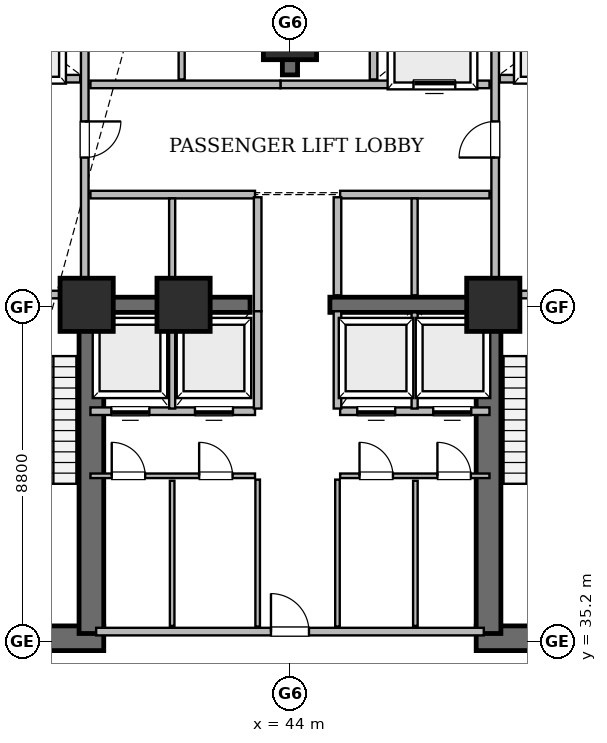
"""IFC4 building model, lengths in metres.
Left out: names, types, materials, properties, quantities, classifications, styles, units other than length and angle.
Written with IfcOpenShell. Run it as: python <this file> out.ifc"""

import sys

from ifc_helpers import new_model, si_unit, direction, frame, frame_2d, origin, origin_2d, place, context, subcontext, project, spatial, rectangle, extrude, element, fill, save


model = new_model("IFC4")
c1 = context("Model", 3, precision=1e-05, world=origin(), true_north=direction((0.0, 1.0)))
c2 = subcontext(c1, "Body", "Model", "MODEL_VIEW")
j1 = project(units=[si_unit("LENGTHUNIT", "METRE"), si_unit("PLANEANGLEUNIT", "RADIAN")], contexts=[c1])
p1 = place(None, origin())
s1 = spatial("IfcSite", under=j1, at=p1, CompositionType="ELEMENT")
p2 = place(p1, origin())
s2 = spatial("IfcBuilding", under=s1, at=p2, CompositionType="ELEMENT")
p3 = place(p2, frame((0.0, 0.0, 9.6)))
s3 = spatial("IfcBuildingStorey", under=s2, at=p3, CompositionType="ELEMENT", Elevation=9.6)
for number, where, z_axis, x_axis in (
    (1, (34.95, 35.275, 0.0), (0.0, 0.0, 1.0), (1.0, 0.0, 0.0)),
    (2, (48.9, 35.275, 0.0), (0.0, 0.0, 1.0), (1.0, 0.0, 0.0)),
):
    element("IfcWall", number, at=place(p3, frame(where, z_axis=z_axis, x_axis=x_axis)), inside=s3, PredefinedType="SHEAR", context=c2, shape_type="SweptSolid", body=[
        extrude(rectangle(XDim=4.15, YDim=0.65, at=frame_2d((2.075, 0.0))), origin(), (0.0, 0.0, 1.0), 4.5),
    ])
for number, where, z_axis, x_axis in (
    (3, (38.775, 35.4, 0.0), (0.0, 0.0, 1.0), (0.0, 1.0, 0.0)),
    (4, (49.225, 35.4, 0.0), (0.0, 0.0, 1.0), (0.0, 1.0, 0.0)),
):
    element("IfcWall", number, at=place(p3, frame(where, z_axis=z_axis, x_axis=x_axis)), inside=s3, PredefinedType="SHEAR", context=c2, shape_type="SweptSolid", body=[
        extrude(rectangle(XDim=8.95, YDim=0.65, at=frame_2d((4.475, 0.0))), origin(), (0.0, 0.0, 1.0), 4.5),
    ])
p4 = place(p3, frame((44.0, 50.1, 0.0), z_axis=(0.0, 0.0, 1.0), x_axis=(0.0, 1.0, 0.0)))
e5 = element("IfcWall", 5, at=p4, inside=s3, PredefinedType="SHEAR", context=c2, shape_type="SweptSolid", body=[
    extrude(rectangle(XDim=2.1, YDim=0.4, at=frame_2d((1.05, 0.0))), origin(), (0.0, 0.0, 1.0), 4.5),
])
for number, where, z_axis, x_axis in (
    (6, (38.75, 44.05, 0.0), (0.0, 0.0, 1.0), (1.0, 0.0, 0.0)),
    (7, (45.05, 44.05, 0.0), (0.0, 0.0, 1.0), (1.0, 0.0, 0.0)),
):
    element("IfcWall", number, at=place(p3, frame(where, z_axis=z_axis, x_axis=x_axis)), inside=s3, PredefinedType="SHEAR", context=c2, shape_type="SweptSolid", body=[
        extrude(rectangle(XDim=4.2, YDim=0.4, at=frame_2d((2.1, 0.0))), origin(), (0.0, 0.0, 1.0), 4.5),
    ])
for number, where, z_axis, x_axis in (
    (8, (38.65, 44.05, 0.0), (0.0, 0.0, 1.0), (1.0, 0.0, 0.0)),
    (9, (49.35, 44.05, 0.0), (0.0, 0.0, 1.0), (1.0, 0.0, 0.0)),
    (10, (44.0, 51.2, 0.0), (0.0, 0.0, 1.0), (1.0, 0.0, 0.0)),
    (11, (41.2, 44.05, 0.0), (0.0, 0.0, 1.0), (1.0, 0.0, 0.0)),
):
    element("IfcColumn", number, at=place(p3, frame(where, z_axis=z_axis, x_axis=x_axis)), inside=s3, PredefinedType="COLUMN", context=c2, shape_type="SweptSolid", body=[
        extrude(rectangle(XDim=1.4, YDim=1.4, at=origin_2d()), origin(), (0.0, 0.0, 1.0), 4.8),
    ])
p5 = place(p3, frame((38.9, 35.45, 0.0), z_axis=(0.0, 0.0, 1.0), x_axis=(1.0, 0.0, 0.0)))
e12 = element("IfcWall", 12, at=p5, inside=s3, PredefinedType="SOLIDWALL", context=c2, shape_type="SweptSolid", body=[
    extrude(rectangle(XDim=10.2, YDim=0.2, at=frame_2d((5.1, 0.0))), origin(), (0.0, 0.0, 1.0), 4.5),
])
p6 = place(p5, frame((4.6, 0.0, 0.0)))
e13 = element("IfcOpeningElement", 13, at=p6, cuts=e12, PredefinedType="OPENING", context=c2, shape_type="SweptSolid", body=[
    extrude(rectangle(XDim=1.0, YDim=2.15, at=frame_2d((0.5, 1.075))), frame((0.0, 0.11, 0.0), z_axis=(0.0, -1.0, 0.0), x_axis=(1.0, 0.0, 0.0)), (0.0, 0.0, 1.0), 0.22),
])
p7 = place(p3, frame((38.6, 44.5, 0.0), z_axis=(0.0, 0.0, 1.0), x_axis=(0.0, 1.0, 0.0)))
e14 = element("IfcWall", 14, at=p7, inside=s3, PredefinedType="SOLIDWALL", context=c2, shape_type="SweptSolid", body=[
    extrude(rectangle(XDim=7.92, YDim=0.2, at=frame_2d((3.96, 0.0))), origin(), (0.0, 0.0, 1.0), 4.5),
])
p8 = place(p7, frame((3.425, 0.0, 0.0)))
e15 = element("IfcOpeningElement", 15, at=p8, cuts=e14, PredefinedType="OPENING", context=c2, shape_type="SweptSolid", body=[
    extrude(rectangle(XDim=0.95, YDim=2.15, at=frame_2d((0.475, 1.075))), frame((0.0, 0.11, 0.0), z_axis=(0.0, -1.0, 0.0), x_axis=(1.0, 0.0, 0.0)), (0.0, 0.0, 1.0), 0.22),
])
p9 = place(p3, frame((49.4, 44.5, 0.0), z_axis=(0.0, 0.0, 1.0), x_axis=(0.0, 1.0, 0.0)))
e16 = element("IfcWall", 16, at=p9, inside=s3, PredefinedType="SOLIDWALL", context=c2, shape_type="SweptSolid", body=[
    extrude(rectangle(XDim=7.92, YDim=0.2, at=frame_2d((3.96, 0.0))), origin(), (0.0, 0.0, 1.0), 3.588),
])
p10 = place(p9, frame((3.425, 0.0, 0.0)))
e17 = element("IfcOpeningElement", 17, at=p10, cuts=e16, PredefinedType="OPENING", context=c2, shape_type="SweptSolid", body=[
    extrude(rectangle(XDim=0.95, YDim=2.15, at=frame_2d((0.475, 1.075))), frame((0.0, 0.11, 0.0), z_axis=(0.0, -1.0, 0.0), x_axis=(1.0, 0.0, 0.0)), (0.0, 0.0, 1.0), 0.22),
])
p11 = place(p3, frame((43.75, 49.85, 0.0), z_axis=(0.0, 0.0, 1.0), x_axis=(1.0, 0.0, 0.0)))
e18 = element("IfcWall", 18, at=p11, inside=s3, PredefinedType="SOLIDWALL", context=c2, shape_type="SweptSolid", body=[
    extrude(rectangle(XDim=5.5, YDim=0.2, at=frame_2d((2.75, 0.0))), origin(), (0.0, 0.0, 1.0), 3.588),
])
p12 = place(p11, frame((3.5, 0.0, 0.0)))
e19 = element("IfcOpeningElement", 19, at=p12, cuts=e18, PredefinedType="OPENING", context=c2, shape_type="SweptSolid", body=[
    extrude(rectangle(XDim=1.1, YDim=2.15, at=frame_2d((0.55, 1.075))), frame((0.0, 0.11, 0.0), z_axis=(0.0, -1.0, 0.0), x_axis=(1.0, 0.0, 0.0)), (0.0, 0.0, 1.0), 0.22),
])
p13 = place(p3, frame((38.75, 41.25, 0.0), z_axis=(0.0, 0.0, 1.0), x_axis=(1.0, 0.0, 0.0)))
e20 = element("IfcWall", 20, at=p13, inside=s3, PredefinedType="SOLIDWALL", context=c2, shape_type="SweptSolid", body=[
    extrude(rectangle(XDim=4.33, YDim=0.2, at=frame_2d((2.165, 0.0))), origin(), (0.0, 0.0, 1.0), 4.5),
])
p14 = place(p13, frame((0.55, 0.0, 0.0)))
e21 = element("IfcOpeningElement", 21, at=p14, cuts=e20, PredefinedType="OPENING", context=c2, shape_type="SweptSolid", body=[
    extrude(rectangle(XDim=1.0, YDim=2.15, at=frame_2d((0.5, 1.075))), frame((0.0, 0.11, 0.0), z_axis=(0.0, -1.0, 0.0), x_axis=(1.0, 0.0, 0.0)), (0.0, 0.0, 1.0), 0.22),
])
p15 = place(p13, frame((2.75, 0.0, 0.0)))
e22 = element("IfcOpeningElement", 22, at=p15, cuts=e20, PredefinedType="OPENING", context=c2, shape_type="SweptSolid", body=[
    extrude(rectangle(XDim=1.0, YDim=2.15, at=frame_2d((0.5, 1.075))), frame((0.0, 0.11, 0.0), z_axis=(0.0, -1.0, 0.0), x_axis=(1.0, 0.0, 0.0)), (0.0, 0.0, 1.0), 0.22),
])
p16 = place(p3, frame((38.75, 39.55, 0.0), z_axis=(0.0, 0.0, 1.0), x_axis=(1.0, 0.0, 0.0)))
e23 = element("IfcWall", 23, at=p16, inside=s3, PredefinedType="PARTITIONING", context=c2, shape_type="SweptSolid", body=[
    extrude(rectangle(XDim=4.33, YDim=0.12, at=frame_2d((2.165, 0.0))), origin(), (0.0, 0.0, 1.0), 4.5),
])
p17 = place(p16, frame((0.56, 0.0, 0.0)))
e24 = element("IfcOpeningElement", 24, at=p17, cuts=e23, PredefinedType="OPENING", context=c2, shape_type="SweptSolid", body=[
    extrude(rectangle(XDim=0.88, YDim=2.1, at=frame_2d((0.44, 1.05))), frame((0.0, 0.07, 0.0), z_axis=(0.0, -1.0, 0.0), x_axis=(1.0, 0.0, 0.0)), (0.0, 0.0, 1.0), 0.14),
])
p18 = place(p16, frame((2.86, 0.0, 0.0)))
e25 = element("IfcOpeningElement", 25, at=p18, cuts=e23, PredefinedType="OPENING", context=c2, shape_type="SweptSolid", body=[
    extrude(rectangle(XDim=0.88, YDim=2.1, at=frame_2d((0.44, 1.05))), frame((0.0, 0.07, 0.0), z_axis=(0.0, -1.0, 0.0), x_axis=(1.0, 0.0, 0.0)), (0.0, 0.0, 1.0), 0.14),
])
p19 = place(p3, frame((45.32, 41.25, 0.0), z_axis=(0.0, 0.0, 1.0), x_axis=(1.0, 0.0, 0.0)))
e26 = element("IfcWall", 26, at=p19, inside=s3, PredefinedType="SOLIDWALL", context=c2, shape_type="SweptSolid", body=[
    extrude(rectangle(XDim=3.93, YDim=0.2, at=frame_2d((1.965, 0.0))), origin(), (0.0, 0.0, 1.0), 4.5),
])
p20 = place(p19, frame((0.45, 0.0, 0.0)))
e27 = element("IfcOpeningElement", 27, at=p20, cuts=e26, PredefinedType="OPENING", context=c2, shape_type="SweptSolid", body=[
    extrude(rectangle(XDim=1.0, YDim=2.15, at=frame_2d((0.5, 1.075))), frame((0.0, 0.11, 0.0), z_axis=(0.0, -1.0, 0.0), x_axis=(1.0, 0.0, 0.0)), (0.0, 0.0, 1.0), 0.22),
])
p21 = place(p19, frame((2.45, 0.0, 0.0)))
e28 = element("IfcOpeningElement", 28, at=p21, cuts=e26, PredefinedType="OPENING", context=c2, shape_type="SweptSolid", body=[
    extrude(rectangle(XDim=1.0, YDim=2.15, at=frame_2d((0.5, 1.075))), frame((0.0, 0.11, 0.0), z_axis=(0.0, -1.0, 0.0), x_axis=(1.0, 0.0, 0.0)), (0.0, 0.0, 1.0), 0.22),
])
p22 = place(p3, frame((45.32, 39.55, 0.0), z_axis=(0.0, 0.0, 1.0), x_axis=(1.0, 0.0, 0.0)))
e29 = element("IfcWall", 29, at=p22, inside=s3, PredefinedType="PARTITIONING", context=c2, shape_type="SweptSolid", body=[
    extrude(rectangle(XDim=3.93, YDim=0.12, at=frame_2d((1.965, 0.0))), origin(), (0.0, 0.0, 1.0), 4.5),
])
p23 = place(p22, frame((0.51, 0.0, 0.0)))
e30 = element("IfcOpeningElement", 30, at=p23, cuts=e29, PredefinedType="OPENING", context=c2, shape_type="SweptSolid", body=[
    extrude(rectangle(XDim=0.88, YDim=2.1, at=frame_2d((0.44, 1.05))), frame((0.0, 0.07, 0.0), z_axis=(0.0, -1.0, 0.0), x_axis=(1.0, 0.0, 0.0)), (0.0, 0.0, 1.0), 0.14),
])
p24 = place(p22, frame((2.56, 0.0, 0.0)))
e31 = element("IfcOpeningElement", 31, at=p24, cuts=e29, PredefinedType="OPENING", context=c2, shape_type="SweptSolid", body=[
    extrude(rectangle(XDim=0.88, YDim=2.1, at=frame_2d((0.44, 1.05))), frame((0.0, 0.07, 0.0), z_axis=(0.0, -1.0, 0.0), x_axis=(1.0, 0.0, 0.0)), (0.0, 0.0, 1.0), 0.14),
])
p25 = place(p3, frame((35.65, 44.32, 0.0), z_axis=(0.0, 0.0, 1.0), x_axis=(1.0, 0.0, 0.0)))
e32 = element("IfcWall", 32, at=p25, inside=s3, PredefinedType="SOLIDWALL", context=c2, shape_type="SweptSolid", body=[
    extrude(rectangle(XDim=2.8, YDim=0.2, at=frame_2d((1.4, 0.0))), origin(), (0.0, 0.0, 1.0), 4.5),
])
p26 = place(p25, frame((0.9, 0.0, 0.0)))
e33 = element("IfcOpeningElement", 33, at=p26, cuts=e32, PredefinedType="OPENING", context=c2, shape_type="SweptSolid", body=[
    extrude(rectangle(XDim=1.0, YDim=2.15, at=frame_2d((0.5, 1.075))), frame((0.0, 0.11, 0.0), z_axis=(0.0, -1.0, 0.0), x_axis=(1.0, 0.0, 0.0)), (0.0, 0.0, 1.0), 0.22),
])
p27 = place(p3, frame((49.55, 44.32, 0.0), z_axis=(0.0, 0.0, 1.0), x_axis=(1.0, 0.0, 0.0)))
e34 = element("IfcWall", 34, at=p27, inside=s3, PredefinedType="SOLIDWALL", context=c2, shape_type="SweptSolid", body=[
    extrude(rectangle(XDim=2.8, YDim=0.2, at=frame_2d((1.4, 0.0))), origin(), (0.0, 0.0, 1.0), 3.588),
])
p28 = place(p27, frame((0.9, 0.0, 0.0)))
e35 = element("IfcOpeningElement", 35, at=p28, cuts=e34, PredefinedType="OPENING", context=c2, shape_type="SweptSolid", body=[
    extrude(rectangle(XDim=1.0, YDim=2.15, at=frame_2d((0.5, 1.075))), frame((0.0, 0.11, 0.0), z_axis=(0.0, -1.0, 0.0), x_axis=(1.0, 0.0, 0.0)), (0.0, 0.0, 1.0), 0.22),
])
p29 = place(p3, frame((35.68, 50.0, 0.0), z_axis=(0.0, 0.0, 1.0), x_axis=(1.0, 0.0, 0.0)))
e36 = element("IfcWall", 36, at=p29, inside=s3, PredefinedType="SOLIDWALL", context=c2, shape_type="SweptSolid", body=[
    extrude(rectangle(XDim=2.8, YDim=0.2, at=frame_2d((1.4, 0.0))), origin(), (0.0, 0.0, 1.0), 4.5),
])
p30 = place(p29, frame((0.85, 0.0, 0.0)))
e37 = element("IfcOpeningElement", 37, at=p30, cuts=e36, PredefinedType="OPENING", context=c2, shape_type="SweptSolid", body=[
    extrude(rectangle(XDim=1.1, YDim=2.15, at=frame_2d((0.55, 1.075))), frame((0.0, 0.11, 0.0), z_axis=(0.0, -1.0, 0.0), x_axis=(1.0, 0.0, 0.0)), (0.0, 0.0, 1.0), 0.22),
])
p31 = place(p3, frame((49.52, 50.0, 0.0), z_axis=(0.0, 0.0, 1.0), x_axis=(1.0, 0.0, 0.0)))
e38 = element("IfcWall", 38, at=p31, inside=s3, PredefinedType="SOLIDWALL", context=c2, shape_type="SweptSolid", body=[
    extrude(rectangle(XDim=2.8, YDim=0.2, at=frame_2d((1.4, 0.0))), origin(), (0.0, 0.0, 1.0), 4.5),
])
p32 = place(p31, frame((0.85, 0.0, 0.0)))
e39 = element("IfcOpeningElement", 39, at=p32, cuts=e38, PredefinedType="OPENING", context=c2, shape_type="SweptSolid", body=[
    extrude(rectangle(XDim=1.1, YDim=2.15, at=frame_2d((0.55, 1.075))), frame((0.0, 0.11, 0.0), z_axis=(0.0, -1.0, 0.0), x_axis=(1.0, 0.0, 0.0)), (0.0, 0.0, 1.0), 0.22),
])
p33 = place(p3, frame((38.75, 49.85, 0.0), z_axis=(0.0, 0.0, 1.0), x_axis=(1.0, 0.0, 0.0)))
e40 = element("IfcWall", 40, at=p33, inside=s3, PredefinedType="SOLIDWALL", context=c2, shape_type="SweptSolid", body=[
    extrude(rectangle(XDim=5.0, YDim=0.2, at=frame_2d((2.5, 0.0))), origin(), (0.0, 0.0, 1.0), 4.5),
])
p34 = place(p3, frame((38.75, 46.95, 0.0), z_axis=(0.0, 0.0, 1.0), x_axis=(1.0, 0.0, 0.0)))
e41 = element("IfcWall", 41, at=p34, inside=s3, PredefinedType="SOLIDWALL", context=c2, shape_type="SweptSolid", body=[
    extrude(rectangle(XDim=4.33, YDim=0.2, at=frame_2d((2.165, 0.0))), origin(), (0.0, 0.0, 1.0), 4.5),
])
p35 = place(p3, frame((45.32, 46.95, 0.0), z_axis=(0.0, 0.0, 1.0), x_axis=(1.0, 0.0, 0.0)))
e42 = element("IfcWall", 42, at=p35, inside=s3, PredefinedType="SOLIDWALL", context=c2, shape_type="SweptSolid", body=[
    extrude(rectangle(XDim=3.93, YDim=0.2, at=frame_2d((1.965, 0.0))), origin(), (0.0, 0.0, 1.0), 3.588),
])
for number, where, z_axis, x_axis in (
    (43, (43.15, 35.58, 0.0), (0.0, 0.0, 1.0), (0.0, 1.0, 0.0)),
    (44, (45.25, 35.58, 0.0), (0.0, 0.0, 1.0), (0.0, 1.0, 0.0)),
):
    element("IfcWall", number, at=place(p3, frame(where, z_axis=z_axis, x_axis=x_axis)), inside=s3, PredefinedType="PARTITIONING", context=c2, shape_type="SweptSolid", body=[
        extrude(rectangle(XDim=3.87, YDim=0.12, at=frame_2d((1.935, 0.0))), origin(), (0.0, 0.0, 1.0), 4.5),
    ])
for number, where, z_axis, x_axis in (
    (45, (40.9, 35.6, 0.0), (0.0, 0.0, 1.0), (0.0, 1.0, 0.0)),
    (46, (47.3, 35.6, 0.0), (0.0, 0.0, 1.0), (0.0, 1.0, 0.0)),
):
    element("IfcWall", number, at=place(p3, frame(where, z_axis=z_axis, x_axis=x_axis)), inside=s3, PredefinedType="PARTITIONING", context=c2, shape_type="SweptSolid", body=[
        extrude(rectangle(XDim=3.82, YDim=0.12, at=frame_2d((1.91, 0.0))), origin(), (0.0, 0.0, 1.0), 4.5),
    ])
p36 = place(p3, frame((43.15, 43.88, 0.0), z_axis=(0.0, 0.0, 1.0), x_axis=(0.0, 1.0, 0.0)))
e47 = element("IfcWall", 47, at=p36, inside=s3, PredefinedType="SOLIDWALL", context=c2, shape_type="SweptSolid", body=[
    extrude(rectangle(XDim=3.0, YDim=0.2, at=frame_2d((1.5, 0.0))), origin(), (0.0, 0.0, 1.0), 4.5),
])
p37 = place(p3, frame((45.25, 44.3, 0.0), z_axis=(0.0, 0.0, 1.0), x_axis=(0.0, 1.0, 0.0)))
e48 = element("IfcWall", 48, at=p37, inside=s3, PredefinedType="SOLIDWALL", context=c2, shape_type="SweptSolid", body=[
    extrude(rectangle(XDim=2.58, YDim=0.2, at=frame_2d((1.29, 0.0))), origin(), (0.0, 0.0, 1.0), 4.5),
])
for number, where, z_axis, x_axis in (
    (49, (43.15, 41.32, 0.0), (0.0, 0.0, 1.0), (0.0, 1.0, 0.0)),
    (50, (45.25, 41.32, 0.0), (0.0, 0.0, 1.0), (0.0, 1.0, 0.0)),
):
    element("IfcWall", number, at=place(p3, frame(where, z_axis=z_axis, x_axis=x_axis)), inside=s3, PredefinedType="SOLIDWALL", context=c2, shape_type="SweptSolid", body=[
        extrude(rectangle(XDim=2.56, YDim=0.2, at=frame_2d((1.28, 0.0))), origin(), (0.0, 0.0, 1.0), 4.5),
    ])
p38 = place(p3, frame((40.9, 44.3, 0.0), z_axis=(0.0, 0.0, 1.0), x_axis=(0.0, 1.0, 0.0)))
e51 = element("IfcWall", 51, at=p38, inside=s3, PredefinedType="SOLIDWALL", context=c2, shape_type="SweptSolid", body=[
    extrude(rectangle(XDim=2.55, YDim=0.16, at=frame_2d((1.275, 0.0))), origin(), (0.0, 0.0, 1.0), 4.5),
])
p39 = place(p3, frame((47.28, 44.3, 0.0), z_axis=(0.0, 0.0, 1.0), x_axis=(0.0, 1.0, 0.0)))
e52 = element("IfcWall", 52, at=p39, inside=s3, PredefinedType="SOLIDWALL", context=c2, shape_type="SweptSolid", body=[
    extrude(rectangle(XDim=2.55, YDim=0.16, at=frame_2d((1.275, 0.0))), origin(), (0.0, 0.0, 1.0), 3.588),
])
for number, where, z_axis, x_axis in (
    (53, (40.9, 41.32, 0.0), (0.0, 0.0, 1.0), (0.0, 1.0, 0.0)),
    (54, (47.28, 41.32, 0.0), (0.0, 0.0, 1.0), (0.0, 1.0, 0.0)),
):
    element("IfcWall", number, at=place(p3, frame(where, z_axis=z_axis, x_axis=x_axis)), inside=s3, PredefinedType="SOLIDWALL", context=c2, shape_type="SweptSolid", body=[
        extrude(rectangle(XDim=2.53, YDim=0.16, at=frame_2d((1.265, 0.0))), origin(), (0.0, 0.0, 1.0), 4.5),
    ])
p40 = place(p3, frame((41.15, 49.98, 0.0), z_axis=(0.0, 0.0, 1.0), x_axis=(0.0, 1.0, 0.0)))
e55 = element("IfcWall", 55, at=p40, inside=s3, PredefinedType="SOLIDWALL", context=c2, shape_type="SweptSolid", body=[
    extrude(rectangle(XDim=2.37, YDim=0.16, at=frame_2d((1.185, 0.0))), origin(), (0.0, 0.0, 1.0), 4.5),
])
p41 = place(p3, frame((46.2, 49.98, 0.0), z_axis=(0.0, 0.0, 1.0), x_axis=(0.0, 1.0, 0.0)))
e56 = element("IfcWall", 56, at=p41, inside=s3, PredefinedType="SOLIDWALL", context=c2, shape_type="SweptSolid", body=[
    extrude(rectangle(XDim=2.37, YDim=0.2, at=frame_2d((1.185, 0.0))), origin(), (0.0, 0.0, 1.0), 4.5),
])
p42 = place(p8, frame((0.95, 0.0, 0.0), z_axis=(0.0, 0.0, 1.0), x_axis=(-1.0, 0.0, 0.0)))
e57 = element("IfcDoor", 57, at=p42, inside=s3, OperationType="SINGLE_SWING_RIGHT", PredefinedType="DOOR", context=c2, shape_type="SweptSolid", body=[
    extrude(rectangle(XDim=0.95, YDim=2.15, at=frame_2d((0.475, 1.075))), frame((0.0, 0.025, 0.0), z_axis=(0.0, -1.0, 0.0), x_axis=(1.0, 0.0, 0.0)), (0.0, 0.0, 1.0), 0.05),
])
fill(e15, e57)
p43 = place(p10, origin())
e58 = element("IfcDoor", 58, at=p43, inside=s3, OperationType="SINGLE_SWING_LEFT", PredefinedType="DOOR", context=c2, shape_type="SweptSolid", body=[
    extrude(rectangle(XDim=0.95, YDim=2.15, at=frame_2d((0.475, 1.075))), frame((0.0, 0.025, 0.0), z_axis=(0.0, -1.0, 0.0), x_axis=(1.0, 0.0, 0.0)), (0.0, 0.0, 1.0), 0.05),
])
fill(e17, e58)
p44 = place(p6, origin())
e59 = element("IfcDoor", 59, at=p44, inside=s3, OperationType="SINGLE_SWING_LEFT", PredefinedType="DOOR", context=c2, shape_type="SweptSolid", body=[
    extrude(rectangle(XDim=1.0, YDim=2.15, at=frame_2d((0.5, 1.075))), frame((0.0, 0.025, 0.0), z_axis=(0.0, -1.0, 0.0), x_axis=(1.0, 0.0, 0.0)), (0.0, 0.0, 1.0), 0.05),
])
fill(e13, e59)
p45 = place(p12, origin())
e60 = element("IfcDoor", 60, at=p45, inside=s3, OperationType="SLIDING_TO_LEFT", PredefinedType="DOOR", context=c2, shape_type="SweptSolid", body=[
    extrude(rectangle(XDim=1.1, YDim=2.15, at=frame_2d((0.55, 1.075))), frame((0.0, 0.025, 0.0), z_axis=(0.0, -1.0, 0.0), x_axis=(1.0, 0.0, 0.0)), (0.0, 0.0, 1.0), 0.05),
])
fill(e19, e60)
p46 = place(p14, frame((1.0, 0.0, 0.0), z_axis=(0.0, 0.0, 1.0), x_axis=(-1.0, 0.0, 0.0)))
e61 = element("IfcDoor", 61, at=p46, inside=s3, OperationType="SLIDING_TO_LEFT", PredefinedType="DOOR", context=c2, shape_type="SweptSolid", body=[
    extrude(rectangle(XDim=1.0, YDim=2.15, at=frame_2d((0.5, 1.075))), frame((0.0, 0.025, 0.0), z_axis=(0.0, -1.0, 0.0), x_axis=(1.0, 0.0, 0.0)), (0.0, 0.0, 1.0), 0.05),
])
fill(e21, e61)
p47 = place(p15, frame((1.0, 0.0, 0.0), z_axis=(0.0, 0.0, 1.0), x_axis=(-1.0, 0.0, 0.0)))
e62 = element("IfcDoor", 62, at=p47, inside=s3, OperationType="SLIDING_TO_LEFT", PredefinedType="DOOR", context=c2, shape_type="SweptSolid", body=[
    extrude(rectangle(XDim=1.0, YDim=2.15, at=frame_2d((0.5, 1.075))), frame((0.0, 0.025, 0.0), z_axis=(0.0, -1.0, 0.0), x_axis=(1.0, 0.0, 0.0)), (0.0, 0.0, 1.0), 0.05),
])
fill(e22, e62)
p48 = place(p20, frame((1.0, 0.0, 0.0), z_axis=(0.0, 0.0, 1.0), x_axis=(-1.0, 0.0, 0.0)))
e63 = element("IfcDoor", 63, at=p48, inside=s3, OperationType="SLIDING_TO_LEFT", PredefinedType="DOOR", context=c2, shape_type="SweptSolid", body=[
    extrude(rectangle(XDim=1.0, YDim=2.15, at=frame_2d((0.5, 1.075))), frame((0.0, 0.025, 0.0), z_axis=(0.0, -1.0, 0.0), x_axis=(1.0, 0.0, 0.0)), (0.0, 0.0, 1.0), 0.05),
])
fill(e27, e63)
p49 = place(p21, frame((1.0, 0.0, 0.0), z_axis=(0.0, 0.0, 1.0), x_axis=(-1.0, 0.0, 0.0)))
e64 = element("IfcDoor", 64, at=p49, inside=s3, OperationType="SLIDING_TO_LEFT", PredefinedType="DOOR", context=c2, shape_type="SweptSolid", body=[
    extrude(rectangle(XDim=1.0, YDim=2.15, at=frame_2d((0.5, 1.075))), frame((0.0, 0.025, 0.0), z_axis=(0.0, -1.0, 0.0), x_axis=(1.0, 0.0, 0.0)), (0.0, 0.0, 1.0), 0.05),
])
fill(e28, e64)
p50 = place(p17, origin())
e65 = element("IfcDoor", 65, at=p50, inside=s3, OperationType="SINGLE_SWING_LEFT", PredefinedType="DOOR", context=c2, shape_type="SweptSolid", body=[
    extrude(rectangle(XDim=0.88, YDim=2.1, at=frame_2d((0.44, 1.05))), frame((0.0, 0.025, 0.0), z_axis=(0.0, -1.0, 0.0), x_axis=(1.0, 0.0, 0.0)), (0.0, 0.0, 1.0), 0.05),
])
fill(e24, e65)
p51 = place(p18, origin())
e66 = element("IfcDoor", 66, at=p51, inside=s3, OperationType="SINGLE_SWING_LEFT", PredefinedType="DOOR", context=c2, shape_type="SweptSolid", body=[
    extrude(rectangle(XDim=0.88, YDim=2.1, at=frame_2d((0.44, 1.05))), frame((0.0, 0.025, 0.0), z_axis=(0.0, -1.0, 0.0), x_axis=(1.0, 0.0, 0.0)), (0.0, 0.0, 1.0), 0.05),
])
fill(e25, e66)
p52 = place(p23, origin())
e67 = element("IfcDoor", 67, at=p52, inside=s3, OperationType="SINGLE_SWING_LEFT", PredefinedType="DOOR", context=c2, shape_type="SweptSolid", body=[
    extrude(rectangle(XDim=0.88, YDim=2.1, at=frame_2d((0.44, 1.05))), frame((0.0, 0.025, 0.0), z_axis=(0.0, -1.0, 0.0), x_axis=(1.0, 0.0, 0.0)), (0.0, 0.0, 1.0), 0.05),
])
fill(e30, e67)
p53 = place(p24, origin())
e68 = element("IfcDoor", 68, at=p53, inside=s3, OperationType="SINGLE_SWING_LEFT", PredefinedType="DOOR", context=c2, shape_type="SweptSolid", body=[
    extrude(rectangle(XDim=0.88, YDim=2.1, at=frame_2d((0.44, 1.05))), frame((0.0, 0.025, 0.0), z_axis=(0.0, -1.0, 0.0), x_axis=(1.0, 0.0, 0.0)), (0.0, 0.0, 1.0), 0.05),
])
fill(e31, e68)
save(model, sys.argv[1])
